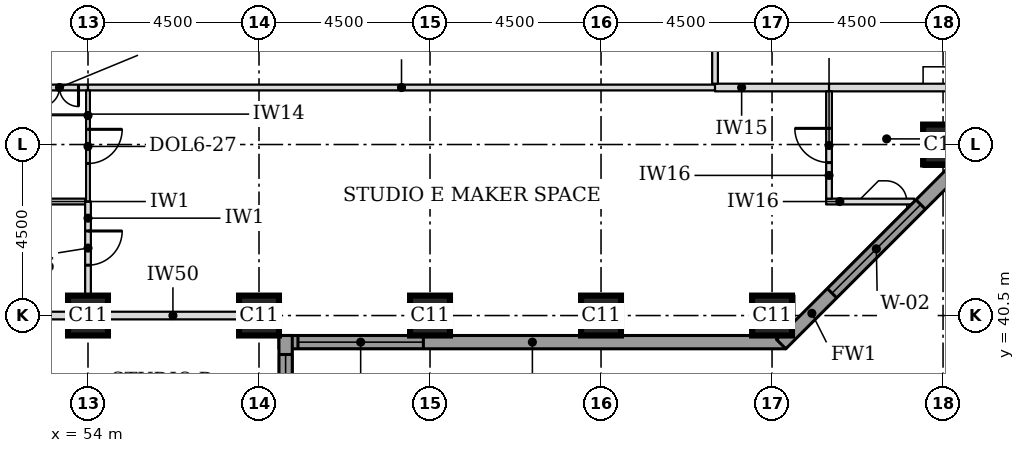
"""IFC4 building model, lengths in metres.
Left out: names, types, materials, properties, quantities, classifications, styles, units other than length and angle.
Written with IfcOpenShell. Run it as: python <this file> out.ifc"""

import sys

from ifc_helpers import new_model, si_unit, direction, frame, frame_2d, origin, origin_2d, place, context, subcontext, project, spatial, rectangle, extrude, element, fill, save


model = new_model("IFC4")
c1 = context("Model", 3, precision=1e-05, world=origin(), true_north=direction((0.0, 1.0)))
c2 = subcontext(c1, "Body", "Model", "MODEL_VIEW")
j1 = project(units=[si_unit("LENGTHUNIT", "METRE"), si_unit("PLANEANGLEUNIT", "RADIAN")], contexts=[c1])
p1 = place(None, origin())
s1 = spatial("IfcSite", under=j1, at=p1, CompositionType="ELEMENT")
p2 = place(p1, origin())
s2 = spatial("IfcBuilding", under=s1, at=p2, CompositionType="ELEMENT")
p3 = place(p2, frame((0.0, 0.0, 119.6)))
s3 = spatial("IfcBuildingStorey", under=s2, at=p3, CompositionType="ELEMENT", Elevation=119.6)
for number, where, z_axis, x_axis in (
    (1, (54.0, 40.5, 0.0), (0.0, 0.0, 1.0), (1.0, 0.0, 0.0)),
    (2, (58.5, 40.5, 0.0), (0.0, 0.0, 1.0), (1.0, 0.0, 0.0)),
    (3, (63.0, 40.5, 0.0), (0.0, 0.0, 1.0), (1.0, 0.0, 0.0)),
    (4, (67.5, 40.5, 0.0), (0.0, 0.0, 1.0), (1.0, 0.0, 0.0)),
    (5, (72.0, 40.5, 0.0), (0.0, 0.0, 1.0), (1.0, 0.0, 0.0)),
    (6, (76.5, 45.0, 0.0), (0.0, 0.0, 1.0), (1.0, 0.0, 0.0)),
):
    element("IfcColumn", number, at=place(p3, frame(where, z_axis=z_axis, x_axis=x_axis)), inside=s3, PredefinedType="COLUMN", context=c2, shape_type="SweptSolid", body=[
        extrude(rectangle(XDim=1.05, YDim=1.05, at=origin_2d()), origin(), (0.0, 0.0, 1.0), 3.7),
    ])
p4 = place(p3, frame((59.025, 39.8, 0.0), z_axis=(0.0, 0.0, 1.0), x_axis=(1.0, 0.0, 0.0)))
e7 = element("IfcWall", 7, at=p4, inside=s3, PredefinedType="STANDARD", context=c2, shape_type="SweptSolid", body=[
    extrude(rectangle(XDim=13.337, YDim=0.35, at=frame_2d((6.669, 0.0))), origin(), (0.0, 0.0, 1.0), 3.525),
])
p5 = place(p4, frame((0.5, 0.0, 0.9)))
e8 = element("IfcOpeningElement", 8, at=p5, cuts=e7, PredefinedType="OPENING", context=c2, shape_type="SweptSolid", body=[
    extrude(rectangle(XDim=3.3, YDim=1.9, at=frame_2d((1.65, 0.95))), frame((0.0, 0.185, 0.0), z_axis=(0.0, -1.0, 0.0), x_axis=(1.0, 0.0, 0.0)), (0.0, 0.0, 1.0), 0.37),
])
p6 = place(p3, frame((72.239, 39.749, 0.0), z_axis=(0.0, 0.0, 1.0), x_axis=(0.707106781187, 0.707106781187, 0.0)))
e9 = element("IfcWall", 9, at=p6, inside=s3, PredefinedType="STANDARD", context=c2, shape_type="SweptSolid", body=[
    extrude(rectangle(XDim=7.089, YDim=0.35, at=frame_2d((3.544, 0.0))), origin(), (0.0, 0.0, 1.0), 3.525),
])
p7 = place(p6, frame((1.894, 0.0, 0.9)))
e10 = element("IfcOpeningElement", 10, at=p7, cuts=e9, PredefinedType="OPENING", context=c2, shape_type="SweptSolid", body=[
    extrude(rectangle(XDim=3.3, YDim=1.9, at=frame_2d((1.65, 0.95))), frame((0.0, 0.185, 0.0), z_axis=(0.0, -1.0, 0.0), x_axis=(1.0, 0.0, 0.0)), (0.0, 0.0, 1.0), 0.37),
])
p8 = place(p3, frame((59.2, 22.138, 0.0), z_axis=(0.0, 0.0, 1.0), x_axis=(0.0, 1.0, 0.0)))
e11 = element("IfcWall", 11, at=p8, inside=s3, PredefinedType="STANDARD", context=c2, shape_type="SweptSolid", body=[
    extrude(rectangle(XDim=17.837, YDim=0.35, at=frame_2d((8.919, 0.0))), origin(), (0.0, 0.0, 1.0), 3.525),
])
p9 = place(p8, frame((5.462, 0.0, 0.9)))
e12 = element("IfcOpeningElement", 12, at=p9, cuts=e11, PredefinedType="OPENING", context=c2, shape_type="SweptSolid", body=[
    extrude(rectangle(XDim=3.3, YDim=1.9, at=frame_2d((1.65, 0.95))), frame((0.0, 0.185, 0.0), z_axis=(0.0, -1.0, 0.0), x_axis=(1.0, 0.0, 0.0)), (0.0, 0.0, 1.0), 0.37),
])
p10 = place(p8, frame((14.037, 0.0, 0.9)))
e13 = element("IfcOpeningElement", 13, at=p10, cuts=e11, PredefinedType="OPENING", context=c2, shape_type="SweptSolid", body=[
    extrude(rectangle(XDim=3.3, YDim=1.9, at=frame_2d((1.65, 0.95))), frame((0.0, 0.185, 0.0), z_axis=(0.0, -1.0, 0.0), x_axis=(1.0, 0.0, 0.0)), (0.0, 0.0, 1.0), 0.37),
])
p11 = place(p3, frame((50.015, 40.5, 0.0), z_axis=(0.0, 0.0, 1.0), x_axis=(1.0, 0.0, 0.0)))
e14 = element("IfcWall", 14, at=p11, inside=s3, PredefinedType="PARTITIONING", context=c2, shape_type="SweptSolid", body=[
    extrude(rectangle(XDim=3.46, YDim=0.2, at=frame_2d((1.73, 0.0))), origin(), (0.0, 0.0, 1.0), 2.8),
])
p12 = place(p3, frame((54.495, 40.5, 0.0), z_axis=(0.0, 0.0, 1.0), x_axis=(1.0, 0.0, 0.0)))
e15 = element("IfcWall", 15, at=p12, inside=s3, PredefinedType="PARTITIONING", context=c2, shape_type="SweptSolid", body=[
    extrude(rectangle(XDim=3.48, YDim=0.2, at=frame_2d((1.74, 0.0))), origin(), (0.0, 0.0, 1.0), 2.8),
])
p13 = place(p3, frame((52.5, 43.5, 0.0), z_axis=(0.0, 0.0, 1.0), x_axis=(1.0, 0.0, 0.0)))
e16 = element("IfcWall", 16, at=p13, inside=s3, PredefinedType="PARTITIONING", context=c2, shape_type="SweptSolid", body=[
    extrude(rectangle(XDim=1.425, YDim=0.15, at=frame_2d((0.712, 0.0))), origin(), (0.0, 0.0, 1.0), 3.55),
])
p14 = place(p3, frame((73.425, 43.5, 0.0), z_axis=(0.0, 0.0, 1.0), x_axis=(1.0, 0.0, 0.0)))
e17 = element("IfcWall", 17, at=p14, inside=s3, PredefinedType="PARTITIONING", context=c2, shape_type="SweptSolid", body=[
    extrude(rectangle(XDim=2.317, YDim=0.15, at=frame_2d((1.159, 0.0))), origin(), (0.0, 0.0, 1.0), 3.55),
])
p15 = place(p3, frame((52.5, 46.5, 0.0), z_axis=(0.0, 0.0, 1.0), x_axis=(1.0, 0.0, 0.0)))
e18 = element("IfcWall", 18, at=p15, inside=s3, PredefinedType="PARTITIONING", context=c2, shape_type="SweptSolid", body=[
    extrude(rectangle(XDim=1.5, YDim=0.15, at=frame_2d((0.75, 0.0))), origin(), (0.0, 0.0, 1.0), 3.55),
])
p16 = place(p15, frame((0.25, 0.0, 0.0)))
e19 = element("IfcOpeningElement", 19, at=p16, cuts=e18, PredefinedType="OPENING", context=c2, shape_type="SweptSolid", body=[
    extrude(rectangle(XDim=1.0, YDim=2.1, at=frame_2d((0.5, 1.05))), frame((0.0, 0.085, 0.0), z_axis=(0.0, -1.0, 0.0), x_axis=(1.0, 0.0, 0.0)), (0.0, 0.0, 1.0), 0.17),
])
p17 = place(p3, frame((54.0, 46.5, 0.0), z_axis=(0.0, 0.0, 1.0), x_axis=(1.0, 0.0, 0.0)))
e20 = element("IfcWall", 20, at=p17, inside=s3, PredefinedType="PARTITIONING", context=c2, shape_type="SweptSolid", body=[
    extrude(rectangle(XDim=16.5, YDim=0.15, at=frame_2d((8.25, 0.0))), origin(), (0.0, 0.0, 1.0), 3.55),
])
p18 = place(p3, frame((70.5, 46.5, 0.0), z_axis=(0.0, 0.0, 1.0), x_axis=(1.0, 0.0, 0.0)))
e21 = element("IfcWall", 21, at=p18, inside=s3, PredefinedType="PARTITIONING", context=c2, shape_type="SweptSolid", body=[
    extrude(rectangle(XDim=3.0, YDim=0.2, at=frame_2d((1.5, 0.0))), origin(), (0.0, 0.0, 1.0), 3.55),
])
p19 = place(p3, frame((73.5, 46.5, 0.0), z_axis=(0.0, 0.0, 1.0), x_axis=(1.0, 0.0, 0.0)))
e22 = element("IfcWall", 22, at=p19, inside=s3, PredefinedType="PARTITIONING", context=c2, shape_type="SweptSolid", body=[
    extrude(rectangle(XDim=3.525, YDim=0.2, at=frame_2d((1.762, 0.0))), origin(), (0.0, 0.0, 1.0), 3.55),
])
p20 = place(p3, frame((54.0, 41.025, 0.0), z_axis=(0.0, 0.0, 1.0), x_axis=(0.0, 1.0, 0.0)))
e23 = element("IfcWall", 23, at=p20, inside=s3, PredefinedType="PARTITIONING", context=c2, shape_type="SweptSolid", body=[
    extrude(rectangle(XDim=2.475, YDim=0.15, at=frame_2d((1.238, 0.0))), origin(), (0.0, 0.0, 1.0), 3.55),
])
p21 = place(p20, frame((0.8, 0.0, 0.0)))
e24 = element("IfcOpeningElement", 24, at=p21, cuts=e23, PredefinedType="OPENING", context=c2, shape_type="SweptSolid", body=[
    extrude(rectangle(XDim=0.9, YDim=2.1, at=frame_2d((0.45, 1.05))), frame((0.0, 0.085, 0.0), z_axis=(0.0, -1.0, 0.0), x_axis=(1.0, 0.0, 0.0)), (0.0, 0.0, 1.0), 0.17),
])
p22 = place(p3, frame((54.0, 43.5, 0.0), z_axis=(0.0, 0.0, 1.0), x_axis=(0.0, 1.0, 0.0)))
e25 = element("IfcWall", 25, at=p22, inside=s3, PredefinedType="PARTITIONING", context=c2, shape_type="SweptSolid", body=[
    extrude(rectangle(XDim=2.925, YDim=0.1, at=frame_2d((1.462, 0.0))), origin(), (0.0, 0.0, 1.0), 3.55),
])
p23 = place(p22, frame((1.0, 0.0, 0.0)))
e26 = element("IfcOpeningElement", 26, at=p23, cuts=e25, PredefinedType="OPENING", context=c2, shape_type="SweptSolid", body=[
    extrude(rectangle(XDim=0.9, YDim=2.1, at=frame_2d((0.45, 1.05))), frame((0.0, 0.06, 0.0), z_axis=(0.0, -1.0, 0.0), x_axis=(1.0, 0.0, 0.0)), (0.0, 0.0, 1.0), 0.12),
])
p24 = place(p3, frame((73.5, 43.575, 0.0), z_axis=(0.0, 0.0, 1.0), x_axis=(0.0, 1.0, 0.0)))
e27 = element("IfcWall", 27, at=p24, inside=s3, PredefinedType="PARTITIONING", context=c2, shape_type="SweptSolid", body=[
    extrude(rectangle(XDim=2.825, YDim=0.15, at=frame_2d((1.413, 0.0))), origin(), (0.0, 0.0, 1.0), 3.55),
])
p25 = place(p24, frame((0.95, 0.0, 0.0)))
e28 = element("IfcOpeningElement", 28, at=p25, cuts=e27, PredefinedType="OPENING", context=c2, shape_type="SweptSolid", body=[
    extrude(rectangle(XDim=0.9, YDim=2.1, at=frame_2d((0.45, 1.05))), frame((0.0, 0.085, 0.0), z_axis=(0.0, -1.0, 0.0), x_axis=(1.0, 0.0, 0.0)), (0.0, 0.0, 1.0), 0.17),
])
p26 = place(p3, frame((70.5, 46.6, 0.0), z_axis=(0.0, 0.0, 1.0), x_axis=(0.0, 1.0, 0.0)))
e29 = element("IfcWall", 29, at=p26, inside=s3, PredefinedType="PARTITIONING", context=c2, shape_type="SweptSolid", body=[
    extrude(rectangle(XDim=13.4, YDim=0.15, at=frame_2d((6.7, 0.0))), origin(), (0.0, 0.0, 1.0), 3.55),
])
p27 = place(p26, frame((6.2, 0.0, 0.0)))
e30 = element("IfcOpeningElement", 30, at=p27, cuts=e29, PredefinedType="OPENING", context=c2, shape_type="SweptSolid", body=[
    extrude(rectangle(XDim=1.0, YDim=2.1, at=frame_2d((0.5, 1.05))), frame((0.0, 0.085, 0.0), z_axis=(0.0, -1.0, 0.0), x_axis=(1.0, 0.0, 0.0)), (0.0, 0.0, 1.0), 0.17),
])
p28 = place(p5, origin())
e31 = element("IfcWindow", 31, at=p28, inside=s3, PartitioningType="SINGLE_PANEL", PredefinedType="WINDOW", context=c2, shape_type="SweptSolid", body=[
    extrude(rectangle(XDim=3.3, YDim=1.9, at=frame_2d((1.65, 0.95))), frame((0.0, 0.085, 0.0), z_axis=(0.0, -1.0, 0.0), x_axis=(1.0, 0.0, 0.0)), (0.0, 0.0, 1.0), 0.06),
])
fill(e8, e31)
p29 = place(p7, origin())
e32 = element("IfcWindow", 32, at=p29, inside=s3, PartitioningType="SINGLE_PANEL", PredefinedType="WINDOW", context=c2, shape_type="SweptSolid", body=[
    extrude(rectangle(XDim=3.3, YDim=1.9, at=frame_2d((1.65, 0.95))), frame((0.0, 0.085, 0.0), z_axis=(0.0, -1.0, 0.0), x_axis=(1.0, 0.0, 0.0)), (0.0, 0.0, 1.0), 0.06),
])
fill(e10, e32)
p30 = place(p10, origin())
e33 = element("IfcWindow", 33, at=p30, inside=s3, PartitioningType="SINGLE_PANEL", PredefinedType="WINDOW", context=c2, shape_type="SweptSolid", body=[
    extrude(rectangle(XDim=3.3, YDim=1.9, at=frame_2d((1.65, 0.95))), frame((0.0, 0.085, 0.0), z_axis=(0.0, -1.0, 0.0), x_axis=(1.0, 0.0, 0.0)), (0.0, 0.0, 1.0), 0.06),
])
fill(e13, e33)
p31 = place(p16, frame((1.0, 0.0, 0.0), z_axis=(0.0, 0.0, 1.0), x_axis=(-1.0, 0.0, 0.0)))
e34 = element("IfcDoor", 34, at=p31, inside=s3, OperationType="DOUBLE_DOOR_SINGLE_SWING", PredefinedType="DOOR", context=c2, shape_type="SweptSolid", body=[
    extrude(rectangle(XDim=1.0, YDim=2.1, at=frame_2d((0.5, 1.05))), frame((0.0, 0.025, 0.0), z_axis=(0.0, -1.0, 0.0), x_axis=(1.0, 0.0, 0.0)), (0.0, 0.0, 1.0), 0.05),
])
fill(e19, e34)
p32 = place(p23, frame((0.9, 0.0, 0.0), z_axis=(0.0, 0.0, 1.0), x_axis=(-1.0, 0.0, 0.0)))
e35 = element("IfcDoor", 35, at=p32, inside=s3, OperationType="SINGLE_SWING_LEFT", PredefinedType="DOOR", context=c2, shape_type="SweptSolid", body=[
    extrude(rectangle(XDim=0.9, YDim=2.1, at=frame_2d((0.45, 1.05))), frame((0.0, 0.025, 0.0), z_axis=(0.0, -1.0, 0.0), x_axis=(1.0, 0.0, 0.0)), (0.0, 0.0, 1.0), 0.05),
])
fill(e26, e35)
p33 = place(p25, origin())
e36 = element("IfcDoor", 36, at=p33, inside=s3, OperationType="SINGLE_SWING_RIGHT", PredefinedType="DOOR", context=c2, shape_type="SweptSolid", body=[
    extrude(rectangle(XDim=0.9, YDim=2.1, at=frame_2d((0.45, 1.05))), frame((0.0, 0.025, 0.0), z_axis=(0.0, -1.0, 0.0), x_axis=(1.0, 0.0, 0.0)), (0.0, 0.0, 1.0), 0.05),
])
fill(e28, e36)
p34 = place(p21, frame((0.9, 0.0, 0.0), z_axis=(0.0, 0.0, 1.0), x_axis=(-1.0, 0.0, 0.0)))
e37 = element("IfcDoor", 37, at=p34, inside=s3, OperationType="SINGLE_SWING_LEFT", PredefinedType="DOOR", context=c2, shape_type="SweptSolid", body=[
    extrude(rectangle(XDim=0.9, YDim=2.1, at=frame_2d((0.45, 1.05))), frame((0.0, 0.025, 0.0), z_axis=(0.0, -1.0, 0.0), x_axis=(1.0, 0.0, 0.0)), (0.0, 0.0, 1.0), 0.05),
])
fill(e24, e37)
save(model, sys.argv[1])
